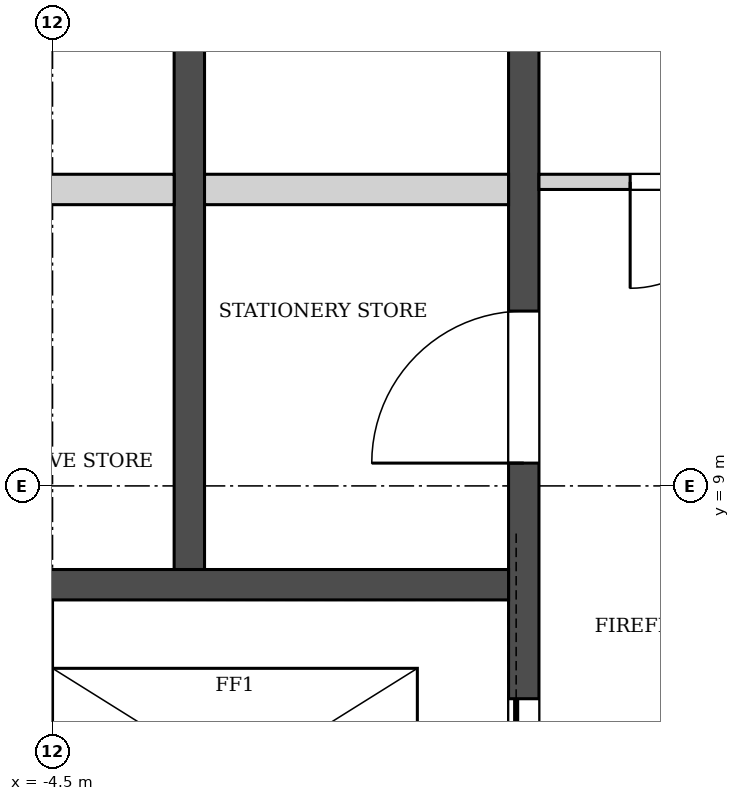
"""IFC4 building model, lengths in metres.
Left out: names, types, materials, properties, quantities, classifications, styles, units other than length and angle.
Written with IfcOpenShell. Run it as: python <this file> out.ifc"""

import sys

from ifc_helpers import new_model, si_unit, direction, frame, frame_2d, origin, place, context, subcontext, project, spatial, rectangle, extrude, element, fill, save


model = new_model("IFC4")
c1 = context("Model", 3, precision=1e-05, world=origin(), true_north=direction((0.0, 1.0)))
c2 = subcontext(c1, "Body", "Model", "MODEL_VIEW")
j1 = project(units=[si_unit("LENGTHUNIT", "METRE"), si_unit("PLANEANGLEUNIT", "RADIAN")], contexts=[c1])
p1 = place(None, origin())
s1 = spatial("IfcSite", under=j1, at=p1, CompositionType="ELEMENT")
p2 = place(p1, origin())
s2 = spatial("IfcBuilding", under=s1, at=p2, CompositionType="ELEMENT")
p3 = place(p2, frame((0.0, 0.0, 339.3)))
s3 = spatial("IfcBuildingStorey", under=s2, at=p3, CompositionType="ELEMENT", Elevation=339.3)
p4 = place(p3, frame((-3.6, 8.45, -0.4), z_axis=(0.0, 0.0, 1.0), x_axis=(0.0, 1.0, 0.0)))
e1 = element("IfcWall", 1, at=p4, inside=s3, PredefinedType="SOLIDWALL", context=c2, shape_type="SweptSolid", body=[
    extrude(rectangle(XDim=7.8, YDim=0.2, at=frame_2d((3.9, 0.0))), origin(), (0.0, 0.0, 1.0), 5.0),
])
p5 = place(p3, frame((-1.4, 5.85, -0.4), z_axis=(0.0, 0.0, 1.0), x_axis=(0.0, 1.0, 0.0)))
e2 = element("IfcWall", 2, at=p5, inside=s3, PredefinedType="SOLIDWALL", context=c2, shape_type="SweptSolid", body=[
    extrude(rectangle(XDim=11.75, YDim=0.2, at=frame_2d((5.875, 0.0))), origin(), (0.0, 0.0, 1.0), 5.0),
])
p6 = place(p5, frame((0.65, 0.0, 0.4)))
e3 = element("IfcOpeningElement", 3, at=p6, cuts=e2, PredefinedType="OPENING", context=c2, shape_type="SweptSolid", body=[
    extrude(rectangle(XDim=1.1, YDim=2.1, at=frame_2d((0.55, 1.05))), frame((0.0, 0.11, 0.0), z_axis=(0.0, -1.0, 0.0), x_axis=(1.0, 0.0, 0.0)), (0.0, 0.0, 1.0), 0.22),
])
p7 = place(p5, frame((3.3, 0.0, 0.4)))
e4 = element("IfcOpeningElement", 4, at=p7, cuts=e2, PredefinedType="OPENING", context=c2, shape_type="SweptSolid", body=[
    extrude(rectangle(XDim=1.0, YDim=2.1, at=frame_2d((0.5, 1.05))), frame((0.0, 0.11, 0.0), z_axis=(0.0, -1.0, 0.0), x_axis=(1.0, 0.0, 0.0)), (0.0, 0.0, 1.0), 0.22),
])
p8 = place(p5, frame((7.2, 0.0, 0.4)))
e5 = element("IfcOpeningElement", 5, at=p8, cuts=e2, PredefinedType="OPENING", context=c2, shape_type="SweptSolid", body=[
    extrude(rectangle(XDim=1.0, YDim=2.1, at=frame_2d((0.5, 1.05))), frame((0.0, 0.11, 0.0), z_axis=(0.0, -1.0, 0.0), x_axis=(1.0, 0.0, 0.0)), (0.0, 0.0, 1.0), 0.22),
])
p9 = place(p3, frame((-5.7, 8.35, -0.4), z_axis=(0.0, 0.0, 1.0), x_axis=(1.0, 0.0, 0.0)))
e6 = element("IfcWall", 6, at=p9, inside=s3, PredefinedType="SOLIDWALL", context=c2, shape_type="SweptSolid", body=[
    extrude(rectangle(XDim=4.2, YDim=0.2, at=frame_2d((2.1, 0.0))), origin(), (0.0, 0.0, 1.0), 5.0),
])
for number, where, z_axis, x_axis in (
    (7, (-5.7, 10.95, 0.0), (0.0, 0.0, 1.0), (1.0, 0.0, 0.0)),
    (8, (-3.5, 10.95, 0.0), (0.0, 0.0, 1.0), (1.0, 0.0, 0.0)),
):
    element("IfcWall", number, at=place(p3, frame(where, z_axis=z_axis, x_axis=x_axis)), inside=s3, PredefinedType="SOLIDWALL", context=c2, shape_type="SweptSolid", body=[
        extrude(rectangle(XDim=2.0, YDim=0.2, at=frame_2d((1.0, 0.0))), origin(), (0.0, 0.0, 1.0), 4.6),
    ])
p10 = place(p3, frame((-1.3, 11.0, 0.0), z_axis=(0.0, 0.0, 1.0), x_axis=(1.0, 0.0, 0.0)))
e9 = element("IfcWall", 9, at=p10, inside=s3, PredefinedType="PARTITIONING", context=c2, shape_type="SweptSolid", body=[
    extrude(rectangle(XDim=2.6, YDim=0.1, at=frame_2d((1.3, 0.0))), origin(), (0.0, 0.0, 1.0), 4.6),
])
p11 = place(p10, frame((0.6, 0.0, 0.0)))
e10 = element("IfcOpeningElement", 10, at=p11, cuts=e9, PredefinedType="OPENING", context=c2, shape_type="SweptSolid", body=[
    extrude(rectangle(XDim=1.4, YDim=2.1, at=frame_2d((0.7, 1.05))), frame((0.0, 0.06, 0.0), z_axis=(0.0, -1.0, 0.0), x_axis=(1.0, 0.0, 0.0)), (0.0, 0.0, 1.0), 0.12),
])
p12 = place(p6, origin())
e11 = element("IfcDoor", 11, at=p12, inside=s3, OperationType="SLIDING_TO_RIGHT", PredefinedType="DOOR", context=c2, shape_type="SweptSolid", body=[
    extrude(rectangle(XDim=1.1, YDim=2.1, at=frame_2d((0.55, 1.05))), frame((0.0, 0.025, 0.0), z_axis=(0.0, -1.0, 0.0), x_axis=(1.0, 0.0, 0.0)), (0.0, 0.0, 1.0), 0.05),
])
fill(e3, e11)
p13 = place(p7, origin())
e12 = element("IfcDoor", 12, at=p13, inside=s3, OperationType="SINGLE_SWING_LEFT", PredefinedType="DOOR", context=c2, shape_type="SweptSolid", body=[
    extrude(rectangle(XDim=1.0, YDim=2.1, at=frame_2d((0.5, 1.05))), frame((0.0, 0.025, 0.0), z_axis=(0.0, -1.0, 0.0), x_axis=(1.0, 0.0, 0.0)), (0.0, 0.0, 1.0), 0.05),
])
fill(e4, e12)
p14 = place(p11, frame((1.4, 0.0, 0.0), z_axis=(0.0, 0.0, 1.0), x_axis=(-1.0, 0.0, 0.0)))
e13 = element("IfcDoor", 13, at=p14, inside=s3, OperationType="DOUBLE_DOOR_SINGLE_SWING", PredefinedType="DOOR", context=c2, shape_type="SweptSolid", body=[
    extrude(rectangle(XDim=1.4, YDim=2.1, at=frame_2d((0.7, 1.05))), frame((0.0, 0.025, 0.0), z_axis=(0.0, -1.0, 0.0), x_axis=(1.0, 0.0, 0.0)), (0.0, 0.0, 1.0), 0.05),
])
fill(e10, e13)
save(model, sys.argv[1])
